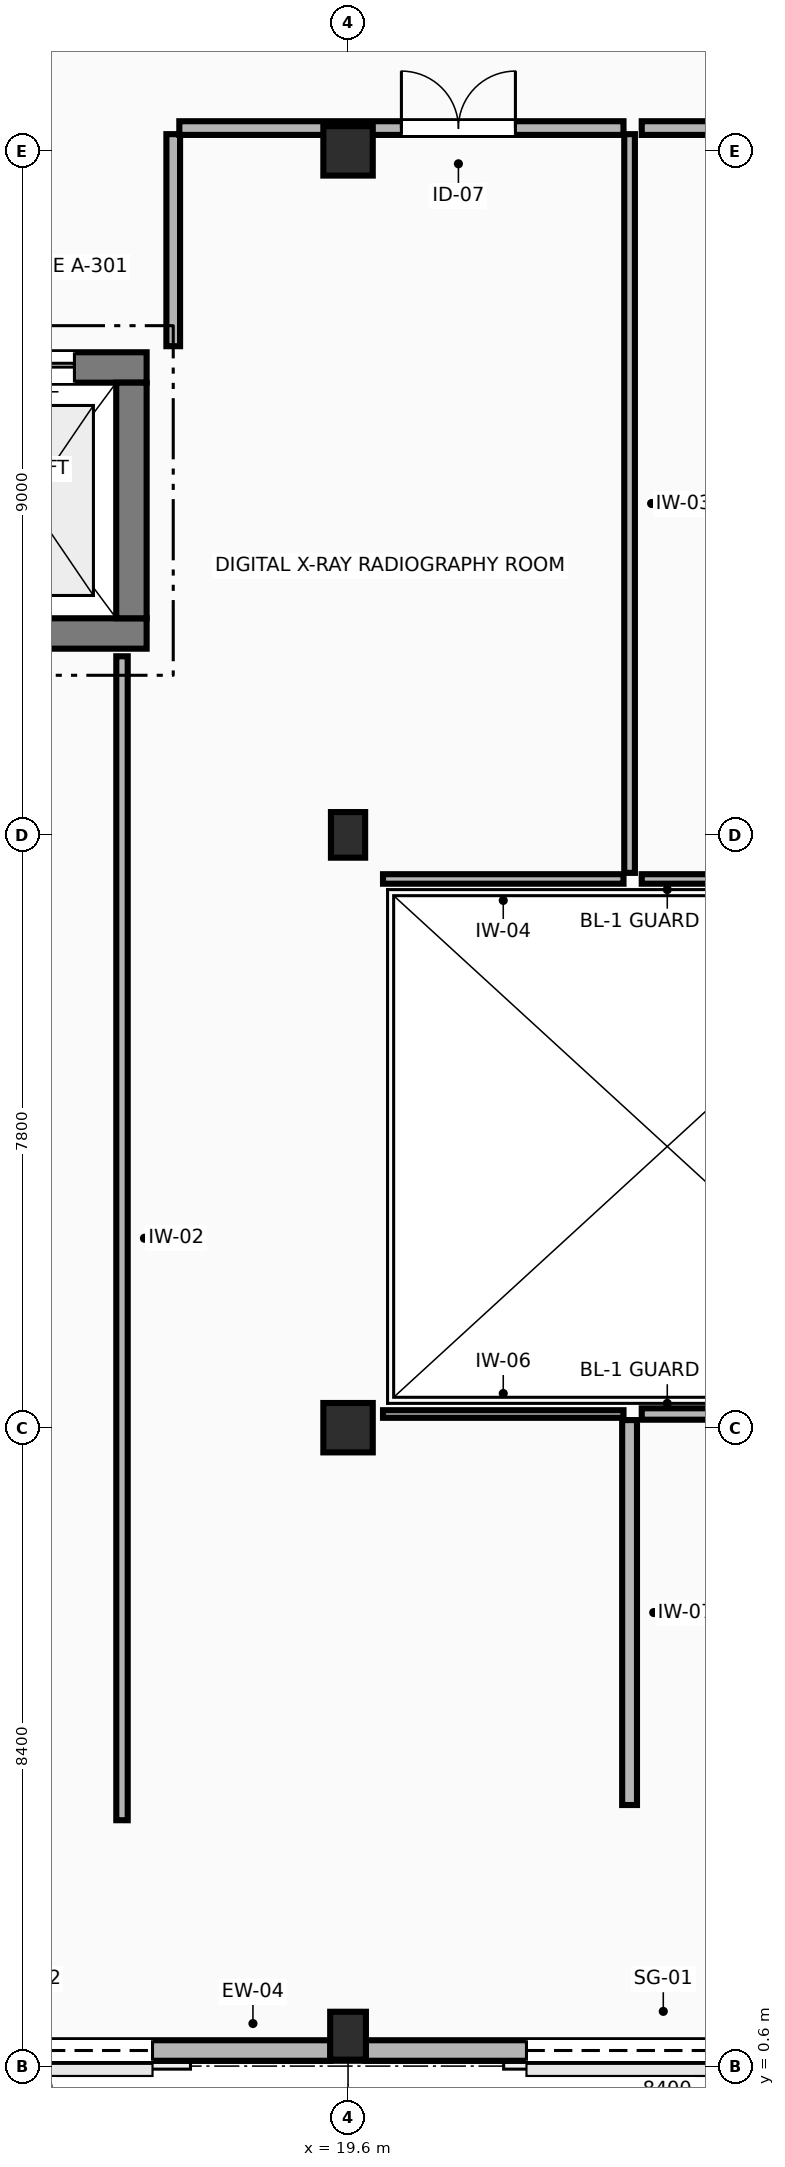
"""IFC4 building model, lengths in metres.
Left out: names, types, materials, properties, quantities, classifications, styles, units other than length and angle.
Written with IfcOpenShell. Run it as: python <this file> out.ifc"""

import sys

from ifc_helpers import new_model, si_unit, direction, frame, frame_2d, origin, origin_2d, place, context, subcontext, project, spatial, rectangle, extrude, element, fill, save


model = new_model("IFC4")
c1 = context("Model", 3, precision=1e-05, world=origin(), true_north=direction((0.0, 1.0)))
c2 = subcontext(c1, "Body", "Model", "MODEL_VIEW")
j1 = project(units=[si_unit("LENGTHUNIT", "METRE"), si_unit("PLANEANGLEUNIT", "RADIAN")], contexts=[c1])
p1 = place(None, origin())
s1 = spatial("IfcSite", under=j1, at=p1, CompositionType="ELEMENT")
p2 = place(p1, origin())
s2 = spatial("IfcBuilding", under=s1, at=p2, CompositionType="ELEMENT")
p3 = place(p2, origin())
s3 = spatial("IfcBuildingStorey", under=s2, at=p3, CompositionType="ELEMENT", Elevation=0.0)
p4 = place(p3, frame((19.6, 1.0, -1.75), z_axis=(0.0, 0.0, 1.0), x_axis=(1.0, 0.0, 0.0)))
e1 = element("IfcColumn", 1, at=p4, inside=s3, PredefinedType="COLUMN", context=c2, shape_type="SweptSolid", body=[
    extrude(rectangle(XDim=0.47, YDim=0.63, at=origin_2d()), origin(), (0.0, 0.0, 1.0), 7.15),
])
p5 = place(p3, frame((19.6, 9.0, 0.0), z_axis=(0.0, 0.0, 1.0), x_axis=(1.0, 0.0, 0.0)))
e2 = element("IfcColumn", 2, at=p5, inside=s3, PredefinedType="COLUMN", context=c2, shape_type="SweptSolid", body=[
    extrude(rectangle(XDim=0.65, YDim=0.65, at=origin_2d()), origin(), (0.0, 0.0, 1.0), 5.4),
])
p6 = place(p3, frame((19.6, 16.8, 0.0), z_axis=(0.0, 0.0, 1.0), x_axis=(1.0, 0.0, 0.0)))
e3 = element("IfcColumn", 3, at=p6, inside=s3, PredefinedType="COLUMN", context=c2, shape_type="SweptSolid", body=[
    extrude(rectangle(XDim=0.45, YDim=0.6, at=origin_2d()), origin(), (0.0, 0.0, 1.0), 5.4),
])
p7 = place(p3, frame((19.6, 25.8, 0.0), z_axis=(0.0, 0.0, 1.0), x_axis=(1.0, 0.0, 0.0)))
e4 = element("IfcColumn", 4, at=p7, inside=s3, PredefinedType="COLUMN", context=c2, shape_type="SweptSolid", body=[
    extrude(rectangle(XDim=0.65, YDim=0.65, at=origin_2d()), origin(), (0.0, 0.0, 1.0), 5.4),
])
p8 = place(p3, frame((11.485, 0.805, 0.0), z_axis=(0.0, 0.0, 1.0), x_axis=(1.0, 0.0, 0.0)))
e5 = element("IfcWall", 5, at=p8, inside=s3, PredefinedType="STANDARD", context=c2, shape_type="SweptSolid", body=[
    extrude(rectangle(XDim=7.885, YDim=0.27, at=frame_2d((3.942, 0.0))), origin(), (0.0, 0.0, 1.0), 4.42),
])
p9 = place(p8, frame((2.343, 0.0, 0.0)))
e6 = element("IfcOpeningElement", 6, at=p9, cuts=e5, PredefinedType="OPENING", context=c2, shape_type="SweptSolid", body=[
    extrude(rectangle(XDim=3.2, YDim=2.8, at=frame_2d((1.6, 1.4))), frame((0.0, 0.145, 0.0), z_axis=(0.0, -1.0, 0.0), x_axis=(1.0, 0.0, 0.0)), (0.0, 0.0, 1.0), 0.29),
])
p10 = place(p3, frame((19.83, 0.805, 0.0), z_axis=(0.0, 0.0, 1.0), x_axis=(1.0, 0.0, 0.0)))
e7 = element("IfcWall", 7, at=p10, inside=s3, PredefinedType="STANDARD", context=c2, shape_type="SweptSolid", body=[
    extrude(rectangle(XDim=7.835, YDim=0.27, at=frame_2d((3.917, 0.0))), origin(), (0.0, 0.0, 1.0), 4.42),
])
p11 = place(p10, frame((2.117, 0.0, 0.0)))
e8 = element("IfcOpeningElement", 8, at=p11, cuts=e7, PredefinedType="OPENING", context=c2, shape_type="SweptSolid", body=[
    extrude(rectangle(XDim=3.6, YDim=3.0, at=frame_2d((1.8, 1.5))), frame((0.0, 0.145, 0.0), z_axis=(0.0, -1.0, 0.0), x_axis=(1.0, 0.0, 0.0)), (0.0, 0.0, 1.0), 0.29),
])
p12 = place(p3, frame((13.85, 19.45, 0.0), z_axis=(0.0, 0.0, 1.0), x_axis=(1.0, 0.0, 0.0)))
e9 = element("IfcWall", 9, at=p12, inside=s3, PredefinedType="SHEAR", context=c2, shape_type="SweptSolid", body=[
    extrude(rectangle(XDim=3.1, YDim=0.4, at=frame_2d((1.55, 0.0))), origin(), (0.0, 0.0, 1.0), 5.4),
])
p13 = place(p3, frame((16.95, 22.95, 0.0), z_axis=(0.0, 0.0, 1.0), x_axis=(-1.0, 0.0, 0.0)))
e10 = element("IfcWall", 10, at=p13, inside=s3, PredefinedType="SHEAR", context=c2, shape_type="SweptSolid", body=[
    extrude(rectangle(XDim=3.1, YDim=0.4, at=frame_2d((1.55, 0.0))), origin(), (0.0, 0.0, 1.0), 5.4),
])
p14 = place(p13, frame((0.95, 0.0, 0.0)))
e11 = element("IfcOpeningElement", 11, at=p14, cuts=e10, PredefinedType="OPENING", context=c2, shape_type="SweptSolid", body=[
    extrude(rectangle(XDim=1.2, YDim=2.2, at=frame_2d((0.6, 1.1))), frame((0.0, 0.21, 0.0), z_axis=(0.0, -1.0, 0.0), x_axis=(1.0, 0.0, 0.0)), (0.0, 0.0, 1.0), 0.42),
])
p15 = place(p3, frame((16.75, 22.75, 0.0), z_axis=(0.0, 0.0, 1.0), x_axis=(0.0, -1.0, 0.0)))
e12 = element("IfcWall", 12, at=p15, inside=s3, PredefinedType="SHEAR", context=c2, shape_type="SweptSolid", body=[
    extrude(rectangle(XDim=3.1, YDim=0.4, at=frame_2d((1.55, 0.0))), origin(), (0.0, 0.0, 1.0), 5.4),
])
p16 = place(p3, frame((16.626, 19.15, 0.0), z_axis=(0.0, 0.0, 1.0), x_axis=(0.0, -1.0, 0.0)))
e13 = element("IfcWall", 13, at=p16, inside=s3, PredefinedType="PARTITIONING", context=c2, shape_type="SweptSolid", body=[
    extrude(rectangle(XDim=15.315, YDim=0.15, at=frame_2d((7.657, 0.0))), origin(), (0.0, 0.0, 1.0), 4.793),
])
p17 = place(p3, frame((17.3, 23.23, 0.0), z_axis=(0.0, 0.0, 1.0), x_axis=(0.0, 1.0, 0.0)))
e14 = element("IfcWall", 14, at=p17, inside=s3, PredefinedType="PARTITIONING", context=c2, shape_type="SweptSolid", body=[
    extrude(rectangle(XDim=2.79, YDim=0.18, at=frame_2d((1.395, 0.0))), origin(), (0.0, 0.0, 1.0), 5.05),
])
p18 = place(p3, frame((17.38, 26.1, 0.0), z_axis=(0.0, 0.0, 1.0), x_axis=(1.0, 0.0, 0.0)))
e15 = element("IfcWall", 15, at=p18, inside=s3, PredefinedType="PARTITIONING", context=c2, shape_type="SweptSolid", body=[
    extrude(rectangle(XDim=5.844, YDim=0.18, at=frame_2d((2.922, 0.0))), origin(), (0.0, 0.0, 1.0), 4.385),
])
p19 = place(p18, frame((2.922, 0.0, 0.0)))
e16 = element("IfcOpeningElement", 16, at=p19, cuts=e15, PredefinedType="OPENING", context=c2, shape_type="SweptSolid", body=[
    extrude(rectangle(XDim=1.5, YDim=2.3, at=frame_2d((0.75, 1.15))), frame((0.0, 0.1, 0.0), z_axis=(0.0, -1.0, 0.0), x_axis=(1.0, 0.0, 0.0)), (0.0, 0.0, 1.0), 0.2),
])
p20 = place(p3, frame((23.304, 26.02, 0.0), z_axis=(0.0, 0.0, 1.0), x_axis=(0.0, -1.0, 0.0)))
e17 = element("IfcWall", 17, at=p20, inside=s3, PredefinedType="PARTITIONING", context=c2, shape_type="SweptSolid", body=[
    extrude(rectangle(XDim=9.72, YDim=0.14, at=frame_2d((4.86, 0.0))), origin(), (0.0, 0.0, 1.0), 5.05),
])
p21 = place(p3, frame((23.224, 16.22, 0.0), z_axis=(0.0, 0.0, 1.0), x_axis=(-1.0, 0.0, 0.0)))
e18 = element("IfcWall", 18, at=p21, inside=s3, PredefinedType="PARTITIONING", context=c2, shape_type="SweptSolid", body=[
    extrude(rectangle(XDim=3.164, YDim=0.125, at=frame_2d((1.582, 0.0))), origin(), (0.0, 0.0, 1.0), 5.05),
])
p22 = place(p3, frame((20.06, 9.18, 0.0), z_axis=(0.0, 0.0, 1.0), x_axis=(1.0, 0.0, 0.0)))
e19 = element("IfcWall", 19, at=p22, inside=s3, PredefinedType="PARTITIONING", context=c2, shape_type="SweptSolid", body=[
    extrude(rectangle(XDim=3.164, YDim=0.1, at=frame_2d((1.582, 0.0))), origin(), (0.0, 0.0, 1.0), 4.46),
])
p23 = place(p3, frame((23.304, 9.1, 0.0), z_axis=(0.0, 0.0, 1.0), x_axis=(0.0, -1.0, 0.0)))
e20 = element("IfcWall", 20, at=p23, inside=s3, PredefinedType="PARTITIONING", context=c2, shape_type="SweptSolid", body=[
    extrude(rectangle(XDim=5.065, YDim=0.195, at=frame_2d((2.533, 0.0))), origin(), (0.0, 0.0, 1.0), 5.05),
])
p24 = place(p3, frame((23.464, 9.18, 0.0), z_axis=(0.0, 0.0, 1.0), x_axis=(1.0, 0.0, 0.0)))
e21 = element("IfcWall", 21, at=p24, inside=s3, PredefinedType="PARTITIONING", context=c2, shape_type="SweptSolid", body=[
    extrude(rectangle(XDim=4.076, YDim=0.15, at=frame_2d((2.038, 0.0))), origin(), (0.0, 0.0, 1.0), 4.46),
])
p25 = place(p3, frame((27.54, 16.22, 0.0), z_axis=(0.0, 0.0, 1.0), x_axis=(-1.0, 0.0, 0.0)))
e22 = element("IfcWall", 22, at=p25, inside=s3, PredefinedType="PARTITIONING", context=c2, shape_type="SweptSolid", body=[
    extrude(rectangle(XDim=4.076, YDim=0.125, at=frame_2d((2.038, 0.0))), origin(), (0.0, 0.0, 1.0), 5.05),
])
p26 = place(p3, frame((23.464, 26.1, 0.0), z_axis=(0.0, 0.0, 1.0), x_axis=(1.0, 0.0, 0.0)))
e23 = element("IfcWall", 23, at=p26, inside=s3, PredefinedType="PARTITIONING", context=c2, shape_type="SweptSolid", body=[
    extrude(rectangle(XDim=4.436, YDim=0.18, at=frame_2d((2.218, 0.0))), origin(), (0.0, 0.0, 1.0), 4.385),
])
p27 = place(p26, frame((1.628, 0.0, 0.0)))
e24 = element("IfcOpeningElement", 24, at=p27, cuts=e23, PredefinedType="OPENING", context=c2, shape_type="SweptSolid", body=[
    extrude(rectangle(XDim=1.18, YDim=2.18, at=frame_2d((0.59, 1.09))), frame((0.0, 0.1, 0.0), z_axis=(0.0, -1.0, 0.0), x_axis=(1.0, 0.0, 0.0)), (0.0, 0.0, 1.0), 0.2),
])
p28 = place(p9, frame((3.2, 0.0, 0.0), z_axis=(0.0, 0.0, 1.0), x_axis=(-1.0, 0.0, 0.0)))
e25 = element("IfcDoor", 25, at=p28, inside=s3, OperationType="DOUBLE_DOOR_SINGLE_SWING", PredefinedType="GATE", context=c2, shape_type="SweptSolid", body=[
    extrude(rectangle(XDim=3.2, YDim=2.8, at=frame_2d((1.6, 1.4))), frame((0.0, 0.025, 0.0), z_axis=(0.0, -1.0, 0.0), x_axis=(1.0, 0.0, 0.0)), (0.0, 0.0, 1.0), 0.05),
])
fill(e6, e25)
p29 = place(p11, frame((3.6, 0.0, 0.0), z_axis=(0.0, 0.0, 1.0), x_axis=(-1.0, 0.0, 0.0)))
e26 = element("IfcDoor", 26, at=p29, inside=s3, OperationType="DOUBLE_DOOR_SINGLE_SWING", PredefinedType="GATE", context=c2, shape_type="SweptSolid", body=[
    extrude(rectangle(XDim=3.6, YDim=3.0, at=frame_2d((1.8, 1.5))), frame((0.0, 0.025, 0.0), z_axis=(0.0, -1.0, 0.0), x_axis=(1.0, 0.0, 0.0)), (0.0, 0.0, 1.0), 0.05),
])
fill(e8, e26)
p30 = place(p14, origin())
e27 = element("IfcDoor", 27, at=p30, inside=s3, OperationType="DOUBLE_DOOR_SLIDING", PredefinedType="DOOR", context=c2, shape_type="SweptSolid", body=[
    extrude(rectangle(XDim=1.2, YDim=2.2, at=frame_2d((0.6, 1.1))), frame((0.0, 0.025, 0.0), z_axis=(0.0, -1.0, 0.0), x_axis=(1.0, 0.0, 0.0)), (0.0, 0.0, 1.0), 0.05),
])
fill(e11, e27)
p31 = place(p19, origin())
e28 = element("IfcDoor", 28, at=p31, inside=s3, OperationType="DOUBLE_DOOR_SINGLE_SWING", PredefinedType="DOOR", context=c2, shape_type="SweptSolid", body=[
    extrude(rectangle(XDim=1.5, YDim=2.3, at=frame_2d((0.75, 1.15))), frame((0.0, 0.025, 0.0), z_axis=(0.0, -1.0, 0.0), x_axis=(1.0, 0.0, 0.0)), (0.0, 0.0, 1.0), 0.05),
])
fill(e16, e28)
save(model, sys.argv[1])
